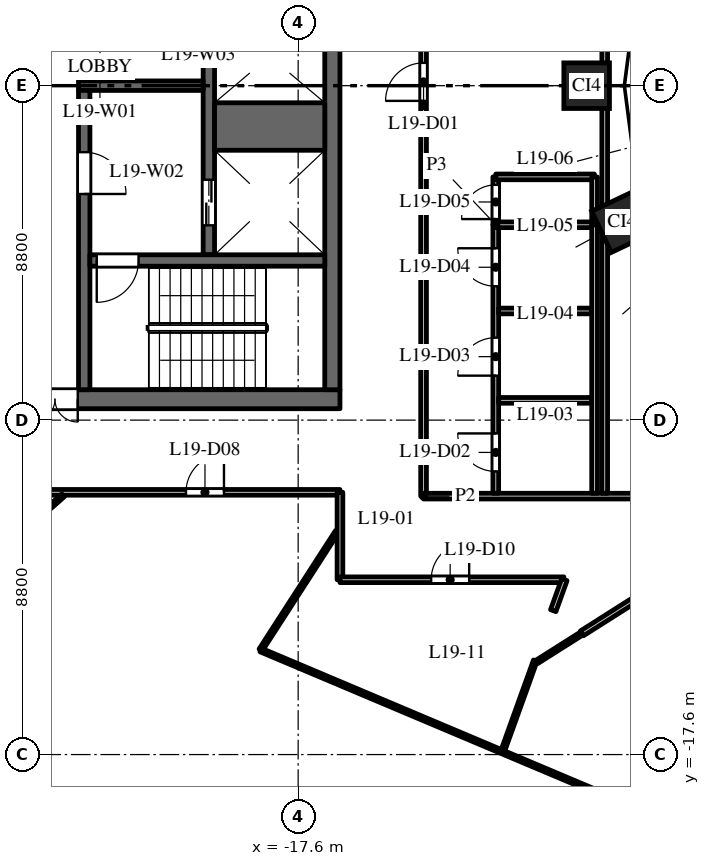
"""IFC4 building model, lengths in metres.
Left out: names, types, materials, properties, quantities, classifications, styles, units other than length and angle.
Written with IfcOpenShell. Run it as: python <this file> out.ifc"""

import sys

from ifc_helpers import new_model, si_unit, direction, frame, frame_2d, origin, origin_2d, place, context, subcontext, project, spatial, rectangle, extrude, element, fill, save


model = new_model("IFC4")
c1 = context("Model", 3, precision=1e-05, world=origin(), true_north=direction((0.0, 1.0)))
c2 = subcontext(c1, "Body", "Model", "MODEL_VIEW")
j1 = project(units=[si_unit("LENGTHUNIT", "METRE"), si_unit("PLANEANGLEUNIT", "RADIAN")], contexts=[c1])
p1 = place(None, origin())
s1 = spatial("IfcSite", under=j1, at=p1, CompositionType="ELEMENT")
p2 = place(p1, origin())
s2 = spatial("IfcBuilding", under=s1, at=p2, CompositionType="ELEMENT")
p3 = place(p2, frame((0.0, 0.0, 88.0)))
s3 = spatial("IfcBuildingStorey", under=s2, at=p3, CompositionType="ELEMENT", Elevation=88.0)
for number, where, z_axis, x_axis in (
    (1, (-10.008, 0.0, 0.0), (0.0, 0.0, 1.0), (0.0, -1.0, 0.0)),
    (2, (-9.076, -3.588, 0.0), (0.0, 0.0, 1.0), (0.429, -0.903, 0.0)),
):
    element("IfcColumn", number, at=place(p3, frame(where, z_axis=z_axis, x_axis=x_axis)), inside=s3, PredefinedType="COLUMN", context=c2, shape_type="SweptSolid", body=[
        extrude(rectangle(XDim=1.2, YDim=1.2, at=origin_2d()), origin(), (0.0, 0.0, 1.0), 4.0),
    ])
p4 = place(p3, frame((-16.5, -8.25, 0.0), z_axis=(0.0, 0.0, 1.0), x_axis=(-1.0, 0.0, 0.0)))
e3 = element("IfcWall", 3, at=p4, inside=s3, PredefinedType="SHEAR", context=c2, shape_type="SweptSolid", body=[
    extrude(rectangle(XDim=15.0, YDim=0.5, at=frame_2d((7.5, 0.0))), origin(), (0.0, 0.0, 1.0), 3.7),
])
p5 = place(p4, frame((6.9, 0.0, 0.0)))
e4 = element("IfcOpeningElement", 4, at=p5, cuts=e3, PredefinedType="OPENING", context=c2, shape_type="SweptSolid", body=[
    extrude(rectangle(XDim=1.2, YDim=2.1, at=frame_2d((0.6, 1.05))), frame((0.0, 0.26, 0.0), z_axis=(0.0, -1.0, 0.0), x_axis=(1.0, 0.0, 0.0)), (0.0, 0.0, 1.0), 0.52),
])
p6 = place(p4, frame((12.05, 0.0, 0.0)))
e5 = element("IfcOpeningElement", 5, at=p6, cuts=e3, PredefinedType="OPENING", context=c2, shape_type="SweptSolid", body=[
    extrude(rectangle(XDim=0.9, YDim=2.1, at=frame_2d((0.45, 1.05))), frame((0.0, 0.26, 0.0), z_axis=(0.0, -1.0, 0.0), x_axis=(1.0, 0.0, 0.0)), (0.0, 0.0, 1.0), 0.52),
])
p7 = place(p3, frame((-19.95, -4.45, 0.0), z_axis=(0.0, 0.0, 1.0), x_axis=(0.0, 1.0, 0.0)))
e6 = element("IfcWall", 6, at=p7, inside=s3, PredefinedType="SHEAR", context=c2, shape_type="SweptSolid", body=[
    extrude(rectangle(XDim=8.9, YDim=0.3, at=frame_2d((4.45, 0.0))), origin(), (0.0, 0.0, 1.0), 3.7),
])
p8 = place(p7, frame((0.775, 0.0, 0.0)))
e7 = element("IfcOpeningElement", 7, at=p8, cuts=e6, PredefinedType="OPENING", context=c2, shape_type="SweptSolid", body=[
    extrude(rectangle(XDim=1.2, YDim=2.1, at=frame_2d((0.6, 1.05))), frame((0.0, 0.16, 0.0), z_axis=(0.0, -1.0, 0.0), x_axis=(1.0, 0.0, 0.0)), (0.0, 0.0, 1.0), 0.32),
])
p9 = place(p7, frame((7.35, 0.0, 0.0)))
e8 = element("IfcOpeningElement", 8, at=p9, cuts=e6, PredefinedType="OPENING", context=c2, shape_type="SweptSolid", body=[
    extrude(rectangle(XDim=0.9, YDim=2.1, at=frame_2d((0.45, 1.05))), frame((0.0, 0.16, 0.0), z_axis=(0.0, -1.0, 0.0), x_axis=(1.0, 0.0, 0.0)), (0.0, 0.0, 1.0), 0.32),
])
p10 = place(p3, frame((-20.1, 0.0, 0.0), z_axis=(0.0, 0.0, 1.0), x_axis=(-1.0, 0.0, 0.0)))
e9 = element("IfcWall", 9, at=p10, inside=s3, PredefinedType="SHEAR", context=c2, shape_type="SweptSolid", body=[
    extrude(rectangle(XDim=3.28, YDim=0.25, at=frame_2d((1.64, 0.0))), origin(), (0.0, 0.0, 1.0), 3.7),
])
p11 = place(p3, frame((-16.7, -8.0, 0.0), z_axis=(0.0, 0.0, 1.0), x_axis=(0.0, 1.0, 0.0)))
e10 = element("IfcWall", 10, at=p11, inside=s3, PredefinedType="SHEAR", context=c2, shape_type="SweptSolid", body=[
    extrude(rectangle(XDim=16.0, YDim=0.4, at=frame_2d((8.0, 0.0))), origin(), (0.0, 0.0, 1.0), 3.7),
])
p12 = place(p3, frame((-16.9, -1.075, 0.0), z_axis=(0.0, 0.0, 1.0), x_axis=(-1.0, 0.0, 0.0)))
e11 = element("IfcWall", 11, at=p12, inside=s3, PredefinedType="SHEAR", context=c2, shape_type="SweptSolid", body=[
    extrude(rectangle(XDim=2.9, YDim=1.25, at=frame_2d((1.45, 0.0))), origin(), (0.0, 0.0, 1.0), 3.7),
])
p13 = place(p3, frame((-23.23, -8.0, 0.0), z_axis=(0.0, 0.0, 1.0), x_axis=(0.0, 1.0, 0.0)))
e12 = element("IfcWall", 12, at=p13, inside=s3, PredefinedType="SHEAR", context=c2, shape_type="SweptSolid", body=[
    extrude(rectangle(XDim=7.875, YDim=0.3, at=frame_2d((3.938, 0.0))), origin(), (0.0, 0.0, 1.0), 3.7),
])
p14 = place(p13, frame((5.15, 0.0, 0.0)))
e13 = element("IfcOpeningElement", 13, at=p14, cuts=e12, PredefinedType="OPENING", context=c2, shape_type="SweptSolid", body=[
    extrude(rectangle(XDim=1.1, YDim=2.1, at=frame_2d((0.55, 1.05))), frame((0.0, 0.16, 0.0), z_axis=(0.0, -1.0, 0.0), x_axis=(1.0, 0.0, 0.0)), (0.0, 0.0, 1.0), 0.32),
])
p15 = place(p3, frame((-16.9, -4.6, 0.0), z_axis=(0.0, 0.0, 1.0), x_axis=(-1.0, 0.0, 0.0)))
e14 = element("IfcWall", 14, at=p15, inside=s3, PredefinedType="SHEAR", context=c2, shape_type="SweptSolid", body=[
    extrude(rectangle(XDim=6.18, YDim=0.3, at=frame_2d((3.09, 0.0))), origin(), (0.0, 0.0, 1.0), 3.7),
])
p16 = place(p15, frame((4.9, 0.0, 0.0)))
e15 = element("IfcOpeningElement", 15, at=p16, cuts=e14, PredefinedType="OPENING", context=c2, shape_type="SweptSolid", body=[
    extrude(rectangle(XDim=1.1, YDim=2.1, at=frame_2d((0.55, 1.05))), frame((0.0, 0.16, 0.0), z_axis=(0.0, -1.0, 0.0), x_axis=(1.0, 0.0, 0.0)), (0.0, 0.0, 1.0), 0.32),
])
p17 = place(p3, frame((-31.5, -10.7, 0.0), z_axis=(0.0, 0.0, 1.0), x_axis=(1.0, 0.0, 0.0)))
e16 = element("IfcWall", 16, at=p17, inside=s3, PredefinedType="PARTITIONING", context=c2, shape_type="SweptSolid", body=[
    extrude(rectangle(XDim=15.0, YDim=0.15, at=frame_2d((7.5, 0.0))), origin(), (0.0, 0.0, 1.0), 3.1),
])
p18 = place(p17, frame((3.4, 0.0, 0.0)))
e17 = element("IfcOpeningElement", 17, at=p18, cuts=e16, PredefinedType="OPENING", context=c2, shape_type="SweptSolid", body=[
    extrude(rectangle(XDim=1.0, YDim=2.1, at=frame_2d((0.5, 1.05))), frame((0.0, 0.085, 0.0), z_axis=(0.0, -1.0, 0.0), x_axis=(1.0, 0.0, 0.0)), (0.0, 0.0, 1.0), 0.17),
])
p19 = place(p17, frame((10.948, 0.0, 0.0)))
e18 = element("IfcOpeningElement", 18, at=p19, cuts=e16, PredefinedType="OPENING", context=c2, shape_type="SweptSolid", body=[
    extrude(rectangle(XDim=1.0, YDim=2.1, at=frame_2d((0.5, 1.05))), frame((0.0, 0.085, 0.0), z_axis=(0.0, -1.0, 0.0), x_axis=(1.0, 0.0, 0.0)), (0.0, 0.0, 1.0), 0.17),
])
p20 = place(p3, frame((-29.569, -15.895, 0.0), z_axis=(0.0, 0.0, 1.0), x_axis=(0.748985701008, 0.662586160198, 0.0)))
e19 = element("IfcWall", 19, at=p20, inside=s3, PredefinedType="PARTITIONING", context=c2, shape_type="SweptSolid", body=[
    extrude(rectangle(XDim=7.723, YDim=0.1, at=frame_2d((3.861, 0.0))), origin(), (0.0, 0.0, 1.0), 2.9),
])
p21 = place(p3, frame((-18.586, -14.849, 0.0), z_axis=(0.0, 0.0, 1.0), x_axis=(0.542227325377, 0.840231829684, 0.0)))
e20 = element("IfcWall", 20, at=p21, inside=s3, PredefinedType="PARTITIONING", context=c2, shape_type="SweptSolid", body=[
    extrude(rectangle(XDim=3.709, YDim=0.1, at=frame_2d((1.854, 0.0))), origin(), (0.0, 0.0, 1.0), 2.75),
])
p22 = place(p3, frame((-18.586, -14.849, 0.0), z_axis=(0.0, 0.0, 1.0), x_axis=(0.921309292198, -0.388830539066, 0.0)))
e21 = element("IfcWall", 21, at=p22, inside=s3, PredefinedType="PARTITIONING", context=c2, shape_type="SweptSolid", body=[
    extrude(rectangle(XDim=10.609, YDim=0.1, at=frame_2d((5.304, 0.0))), origin(), (0.0, 0.0, 1.0), 2.85),
])
p23 = place(p3, frame((-16.5, -13.0, 0.0), z_axis=(0.0, 0.0, 1.0), x_axis=(0.0, 1.0, 0.0)))
e22 = element("IfcWall", 22, at=p23, inside=s3, PredefinedType="PARTITIONING", context=c2, shape_type="SweptSolid", body=[
    extrude(rectangle(XDim=2.3, YDim=0.15, at=frame_2d((1.15, 0.0))), origin(), (0.0, 0.0, 1.0), 2.75),
])
p24 = place(p3, frame((-16.5, -13.0, 0.0), z_axis=(0.0, 0.0, 1.0), x_axis=(1.0, 0.0, 0.0)))
e23 = element("IfcWall", 23, at=p24, inside=s3, PredefinedType="PARTITIONING", context=c2, shape_type="SweptSolid", body=[
    extrude(rectangle(XDim=5.893, YDim=0.15, at=frame_2d((2.947, 0.0))), origin(), (0.0, 0.0, 1.0), 2.85),
])
p25 = place(p24, frame((2.4, 0.0, 0.0)))
e24 = element("IfcOpeningElement", 24, at=p25, cuts=e23, PredefinedType="OPENING", context=c2, shape_type="SweptSolid", body=[
    extrude(rectangle(XDim=1.0, YDim=2.1, at=frame_2d((0.5, 1.05))), frame((0.0, 0.085, 0.0), z_axis=(0.0, -1.0, 0.0), x_axis=(1.0, 0.0, 0.0)), (0.0, 0.0, 1.0), 0.17),
])
p26 = place(p3, frame((-14.3, -10.8, 0.0), z_axis=(0.0, 0.0, 1.0), x_axis=(0.0, 1.0, 0.0)))
e25 = element("IfcWall", 25, at=p26, inside=s3, PredefinedType="PARTITIONING", context=c2, shape_type="SweptSolid", body=[
    extrude(rectangle(XDim=21.6, YDim=0.15, at=frame_2d((10.8, 0.0))), origin(), (0.0, 0.0, 1.0), 2.75),
])
p27 = place(p26, frame((10.4, 0.0, 0.0)))
e26 = element("IfcOpeningElement", 26, at=p27, cuts=e25, PredefinedType="OPENING", context=c2, shape_type="SweptSolid", body=[
    extrude(rectangle(XDim=1.0, YDim=2.1, at=frame_2d((0.5, 1.05))), frame((0.0, 0.085, 0.0), z_axis=(0.0, -1.0, 0.0), x_axis=(1.0, 0.0, 0.0)), (0.0, 0.0, 1.0), 0.17),
])
p28 = place(p3, frame((-14.3, -10.8, 0.0), z_axis=(0.0, 0.0, 1.0), x_axis=(1.0, 0.0, 0.0)))
e27 = element("IfcWall", 27, at=p28, inside=s3, PredefinedType="PARTITIONING", context=c2, shape_type="SweptSolid", body=[
    extrude(rectangle(XDim=28.6, YDim=0.15, at=frame_2d((14.3, 0.0))), origin(), (0.0, 0.0, 1.0), 2.85),
])
p29 = place(p28, frame((11.4, 0.0, 0.0)))
e28 = element("IfcOpeningElement", 28, at=p29, cuts=e27, PredefinedType="OPENING", context=c2, shape_type="SweptSolid", body=[
    extrude(rectangle(XDim=1.0, YDim=2.1, at=frame_2d((0.5, 1.05))), frame((0.0, 0.085, 0.0), z_axis=(0.0, -1.0, 0.0), x_axis=(1.0, 0.0, 0.0)), (0.0, 0.0, 1.0), 0.17),
])
p30 = place(p28, frame((16.167, 0.0, 0.0)))
e29 = element("IfcOpeningElement", 29, at=p30, cuts=e27, PredefinedType="OPENING", context=c2, shape_type="SweptSolid", body=[
    extrude(rectangle(XDim=1.0, YDim=2.1, at=frame_2d((0.5, 1.05))), frame((0.0, 0.085, 0.0), z_axis=(0.0, -1.0, 0.0), x_axis=(1.0, 0.0, 0.0)), (0.0, 0.0, 1.0), 0.17),
])
p31 = place(p3, frame((-12.4, -10.725, 0.0), z_axis=(0.0, 0.0, 1.0), x_axis=(0.0, 1.0, 0.0)))
e30 = element("IfcWall", 30, at=p31, inside=s3, PredefinedType="PARTITIONING", context=c2, shape_type="SweptSolid", body=[
    extrude(rectangle(XDim=7.065, YDim=0.15, at=frame_2d((3.533, 0.0))), origin(), (0.0, 0.0, 1.0), 2.75),
])
p32 = place(p31, frame((0.575, 0.0, 0.0)))
e31 = element("IfcOpeningElement", 31, at=p32, cuts=e30, PredefinedType="OPENING", context=c2, shape_type="SweptSolid", body=[
    extrude(rectangle(XDim=1.0, YDim=2.1, at=frame_2d((0.5, 1.05))), frame((0.0, 0.085, 0.0), z_axis=(0.0, -1.0, 0.0), x_axis=(1.0, 0.0, 0.0)), (0.0, 0.0, 1.0), 0.17),
])
p33 = place(p31, frame((3.095, 0.0, 0.0)))
e32 = element("IfcOpeningElement", 32, at=p33, cuts=e30, PredefinedType="OPENING", context=c2, shape_type="SweptSolid", body=[
    extrude(rectangle(XDim=1.0, YDim=2.1, at=frame_2d((0.5, 1.05))), frame((0.0, 0.085, 0.0), z_axis=(0.0, -1.0, 0.0), x_axis=(1.0, 0.0, 0.0)), (0.0, 0.0, 1.0), 0.17),
])
p34 = place(p31, frame((5.447, 0.0, 0.0)))
e33 = element("IfcOpeningElement", 33, at=p34, cuts=e30, PredefinedType="OPENING", context=c2, shape_type="SweptSolid", body=[
    extrude(rectangle(XDim=1.0, YDim=2.1, at=frame_2d((0.5, 1.05))), frame((0.0, 0.085, 0.0), z_axis=(0.0, -1.0, 0.0), x_axis=(1.0, 0.0, 0.0)), (0.0, 0.0, 1.0), 0.17),
])
p35 = place(p3, frame((-12.325, -8.28, 0.0), z_axis=(0.0, 0.0, 1.0), x_axis=(1.0, 0.0, 0.0)))
e34 = element("IfcWall", 34, at=p35, inside=s3, PredefinedType="PARTITIONING", context=c2, shape_type="SweptSolid", body=[
    extrude(rectangle(XDim=2.45, YDim=0.15, at=frame_2d((1.225, 0.0))), origin(), (0.0, 0.0, 1.0), 2.75),
])
p36 = place(p3, frame((-12.325, -5.928, 0.0), z_axis=(0.0, 0.0, 1.0), x_axis=(1.0, 0.0, 0.0)))
e35 = element("IfcWall", 35, at=p36, inside=s3, PredefinedType="PARTITIONING", context=c2, shape_type="SweptSolid", body=[
    extrude(rectangle(XDim=2.45, YDim=0.15, at=frame_2d((1.225, 0.0))), origin(), (0.0, 0.0, 1.0), 3.7),
])
p37 = place(p3, frame((-12.4, -3.66, 0.0), z_axis=(0.0, 0.0, 1.0), x_axis=(0.0, 1.0, 0.0)))
e36 = element("IfcWall", 36, at=p37, inside=s3, PredefinedType="PARTITIONING", context=c2, shape_type="SweptSolid", body=[
    extrude(rectangle(XDim=1.26, YDim=0.15, at=frame_2d((0.63, 0.0))), origin(), (0.0, 0.0, 1.0), 3.7),
])
p38 = place(p37, frame((0.15, 0.0, 0.0)))
e37 = element("IfcOpeningElement", 37, at=p38, cuts=e36, PredefinedType="OPENING", context=c2, shape_type="SweptSolid", body=[
    extrude(rectangle(XDim=0.9, YDim=2.1, at=frame_2d((0.45, 1.05))), frame((0.0, 0.085, 0.0), z_axis=(0.0, -1.0, 0.0), x_axis=(1.0, 0.0, 0.0)), (0.0, 0.0, 1.0), 0.17),
])
p39 = place(p3, frame((-12.4, -3.66, 0.0), z_axis=(0.0, 0.0, 1.0), x_axis=(1.0, 0.0, 0.0)))
e38 = element("IfcWall", 38, at=p39, inside=s3, PredefinedType="PARTITIONING", context=c2, shape_type="SweptSolid", body=[
    extrude(rectangle(XDim=2.6, YDim=0.15, at=frame_2d((1.3, 0.0))), origin(), (0.0, 0.0, 1.0), 3.7),
])
p40 = place(p3, frame((-12.4, -2.4, 0.0), z_axis=(0.0, 0.0, 1.0), x_axis=(1.0, 0.0, 0.0)))
e39 = element("IfcWall", 39, at=p40, inside=s3, PredefinedType="PARTITIONING", context=c2, shape_type="SweptSolid", body=[
    extrude(rectangle(XDim=2.596, YDim=0.15, at=frame_2d((1.298, 0.0))), origin(), (0.0, 0.0, 1.0), 3.7),
])
p41 = place(p3, frame((-12.209, -17.486, 0.0), z_axis=(0.0, 0.0, 1.0), x_axis=(0.338698771758, 0.940894862357, 0.0)))
e40 = element("IfcWall", 40, at=p41, inside=s3, PredefinedType="PARTITIONING", context=c2, shape_type="SweptSolid", body=[
    extrude(rectangle(XDim=2.506, YDim=0.1, at=frame_2d((1.253, 0.0))), origin(), (0.0, 0.0, 1.0), 3.7),
])
p42 = place(p3, frame((-11.319, -15.161, 0.0), z_axis=(0.0, 0.0, 1.0), x_axis=(0.845102975348, 0.534603555037, 0.0)))
e41 = element("IfcWall", 41, at=p42, inside=s3, PredefinedType="PARTITIONING", context=c2, shape_type="SweptSolid", body=[
    extrude(rectangle(XDim=1.399, YDim=0.1, at=frame_2d((0.699, 0.0))), origin(), (0.0, 0.0, 1.0), 3.7),
])
p43 = place(p3, frame((-10.888, -13.814, 0.0), z_axis=(0.0, 0.0, 1.0), x_axis=(0.338659506624, 0.940908995904, 0.0)))
e42 = element("IfcWall", 42, at=p43, inside=s3, PredefinedType="PARTITIONING", context=c2, shape_type="SweptSolid", body=[
    extrude(rectangle(XDim=0.865, YDim=0.15, at=frame_2d((0.433, 0.0))), origin(), (0.0, 0.0, 1.0), 2.85),
])
p44 = place(p3, frame((-10.137, -14.413, 0.0), z_axis=(0.0, 0.0, 1.0), x_axis=(0.844666662568, 0.535292657475, 0.0)))
e43 = element("IfcWall", 43, at=p44, inside=s3, PredefinedType="PARTITIONING", context=c2, shape_type="SweptSolid", body=[
    extrude(rectangle(XDim=2.776, YDim=0.15, at=frame_2d((1.388, 0.0))), origin(), (0.0, 0.0, 1.0), 3.7),
])
p45 = place(p3, frame((-9.8, -10.725, 0.0), z_axis=(0.0, 0.0, 1.0), x_axis=(0.0, 1.0, 0.0)))
e44 = element("IfcWall", 44, at=p45, inside=s3, PredefinedType="PARTITIONING", context=c2, shape_type="SweptSolid", body=[
    extrude(rectangle(XDim=7.065, YDim=0.15, at=frame_2d((3.533, 0.0))), origin(), (0.0, 0.0, 1.0), 2.75),
])
p46 = place(p3, frame((-9.8, -3.66, 0.0), z_axis=(0.0, 0.0, 1.0), x_axis=(0.0, 1.0, 0.0)))
e45 = element("IfcWall", 45, at=p46, inside=s3, PredefinedType="PARTITIONING", context=c2, shape_type="SweptSolid", body=[
    extrude(rectangle(XDim=1.256, YDim=0.15, at=frame_2d((0.628, 0.0))), origin(), (0.0, 0.0, 1.0), 3.7),
])
p47 = place(p3, frame((-9.533, -10.725, 0.0), z_axis=(0.0, 0.0, 1.0), x_axis=(0.0, 1.0, 0.0)))
e46 = element("IfcWall", 46, at=p47, inside=s3, PredefinedType="PARTITIONING", context=c2, shape_type="SweptSolid", body=[
    extrude(rectangle(XDim=21.45, YDim=0.15, at=frame_2d((10.725, 0.0))), origin(), (0.0, 0.0, 1.0), 2.75),
])
p48 = place(p47, frame((15.575, 0.0, 0.0)))
e47 = element("IfcOpeningElement", 47, at=p48, cuts=e46, PredefinedType="OPENING", context=c2, shape_type="SweptSolid", body=[
    extrude(rectangle(XDim=1.0, YDim=2.1, at=frame_2d((0.5, 1.05))), frame((0.0, 0.085, 0.0), z_axis=(0.0, -1.0, 0.0), x_axis=(1.0, 0.0, 0.0)), (0.0, 0.0, 1.0), 0.17),
])
p49 = place(p8, origin())
e48 = element("IfcDoor", 48, at=p49, inside=s3, OperationType="DOUBLE_DOOR_SLIDING", PredefinedType="DOOR", context=c2, shape_type="SweptSolid", body=[
    extrude(rectangle(XDim=1.2, YDim=2.1, at=frame_2d((0.6, 1.05))), frame((0.0, 0.025, 0.0), z_axis=(0.0, -1.0, 0.0), x_axis=(1.0, 0.0, 0.0)), (0.0, 0.0, 1.0), 0.05),
])
fill(e7, e48)
p50 = place(p16, origin())
e49 = element("IfcDoor", 49, at=p50, inside=s3, OperationType="SINGLE_SWING_LEFT", PredefinedType="DOOR", context=c2, shape_type="SweptSolid", body=[
    extrude(rectangle(XDim=1.1, YDim=2.1, at=frame_2d((0.55, 1.05))), frame((0.0, 0.025, 0.0), z_axis=(0.0, -1.0, 0.0), x_axis=(1.0, 0.0, 0.0)), (0.0, 0.0, 1.0), 0.05),
])
fill(e15, e49)
p51 = place(p14, origin())
e50 = element("IfcDoor", 50, at=p51, inside=s3, OperationType="SINGLE_SWING_LEFT", PredefinedType="DOOR", context=c2, shape_type="SweptSolid", body=[
    extrude(rectangle(XDim=1.1, YDim=2.1, at=frame_2d((0.55, 1.05))), frame((0.0, 0.025, 0.0), z_axis=(0.0, -1.0, 0.0), x_axis=(1.0, 0.0, 0.0)), (0.0, 0.0, 1.0), 0.05),
])
fill(e13, e50)
p52 = place(p5, origin())
e51 = element("IfcDoor", 51, at=p52, inside=s3, OperationType="DOUBLE_DOOR_DOUBLE_SWING", PredefinedType="DOOR", context=c2, shape_type="SweptSolid", body=[
    extrude(rectangle(XDim=1.2, YDim=2.1, at=frame_2d((0.6, 1.05))), frame((0.0, 0.025, 0.0), z_axis=(0.0, -1.0, 0.0), x_axis=(1.0, 0.0, 0.0)), (0.0, 0.0, 1.0), 0.05),
])
fill(e4, e51)
p53 = place(p27, origin())
e52 = element("IfcDoor", 52, at=p53, inside=s3, OperationType="SINGLE_SWING_LEFT", PredefinedType="DOOR", context=c2, shape_type="SweptSolid", body=[
    extrude(rectangle(XDim=1.0, YDim=2.1, at=frame_2d((0.5, 1.05))), frame((0.0, 0.025, 0.0), z_axis=(0.0, -1.0, 0.0), x_axis=(1.0, 0.0, 0.0)), (0.0, 0.0, 1.0), 0.05),
])
fill(e26, e52)
p54 = place(p32, origin())
e53 = element("IfcDoor", 53, at=p54, inside=s3, OperationType="SINGLE_SWING_RIGHT", PredefinedType="DOOR", context=c2, shape_type="SweptSolid", body=[
    extrude(rectangle(XDim=1.0, YDim=2.1, at=frame_2d((0.5, 1.05))), frame((0.0, 0.025, 0.0), z_axis=(0.0, -1.0, 0.0), x_axis=(1.0, 0.0, 0.0)), (0.0, 0.0, 1.0), 0.05),
])
fill(e31, e53)
p55 = place(p33, origin())
e54 = element("IfcDoor", 54, at=p55, inside=s3, OperationType="SINGLE_SWING_LEFT", PredefinedType="DOOR", context=c2, shape_type="SweptSolid", body=[
    extrude(rectangle(XDim=1.0, YDim=2.1, at=frame_2d((0.5, 1.05))), frame((0.0, 0.025, 0.0), z_axis=(0.0, -1.0, 0.0), x_axis=(1.0, 0.0, 0.0)), (0.0, 0.0, 1.0), 0.05),
])
fill(e32, e54)
p56 = place(p34, origin())
e55 = element("IfcDoor", 55, at=p56, inside=s3, OperationType="SINGLE_SWING_RIGHT", PredefinedType="DOOR", context=c2, shape_type="SweptSolid", body=[
    extrude(rectangle(XDim=1.0, YDim=2.1, at=frame_2d((0.5, 1.05))), frame((0.0, 0.025, 0.0), z_axis=(0.0, -1.0, 0.0), x_axis=(1.0, 0.0, 0.0)), (0.0, 0.0, 1.0), 0.05),
])
fill(e33, e55)
p57 = place(p38, origin())
e56 = element("IfcDoor", 56, at=p57, inside=s3, OperationType="SINGLE_SWING_LEFT", PredefinedType="DOOR", context=c2, shape_type="SweptSolid", body=[
    extrude(rectangle(XDim=0.9, YDim=2.1, at=frame_2d((0.45, 1.05))), frame((0.0, 0.025, 0.0), z_axis=(0.0, -1.0, 0.0), x_axis=(1.0, 0.0, 0.0)), (0.0, 0.0, 1.0), 0.05),
])
fill(e37, e56)
p58 = place(p19, origin())
e57 = element("IfcDoor", 57, at=p58, inside=s3, OperationType="SINGLE_SWING_RIGHT", PredefinedType="DOOR", context=c2, shape_type="SweptSolid", body=[
    extrude(rectangle(XDim=1.0, YDim=2.1, at=frame_2d((0.5, 1.05))), frame((0.0, 0.025, 0.0), z_axis=(0.0, -1.0, 0.0), x_axis=(1.0, 0.0, 0.0)), (0.0, 0.0, 1.0), 0.05),
])
fill(e18, e57)
p59 = place(p25, origin())
e58 = element("IfcDoor", 58, at=p59, inside=s3, OperationType="SINGLE_SWING_RIGHT", PredefinedType="DOOR", context=c2, shape_type="SweptSolid", body=[
    extrude(rectangle(XDim=1.0, YDim=2.1, at=frame_2d((0.5, 1.05))), frame((0.0, 0.025, 0.0), z_axis=(0.0, -1.0, 0.0), x_axis=(1.0, 0.0, 0.0)), (0.0, 0.0, 1.0), 0.05),
])
fill(e24, e58)
save(model, sys.argv[1])
